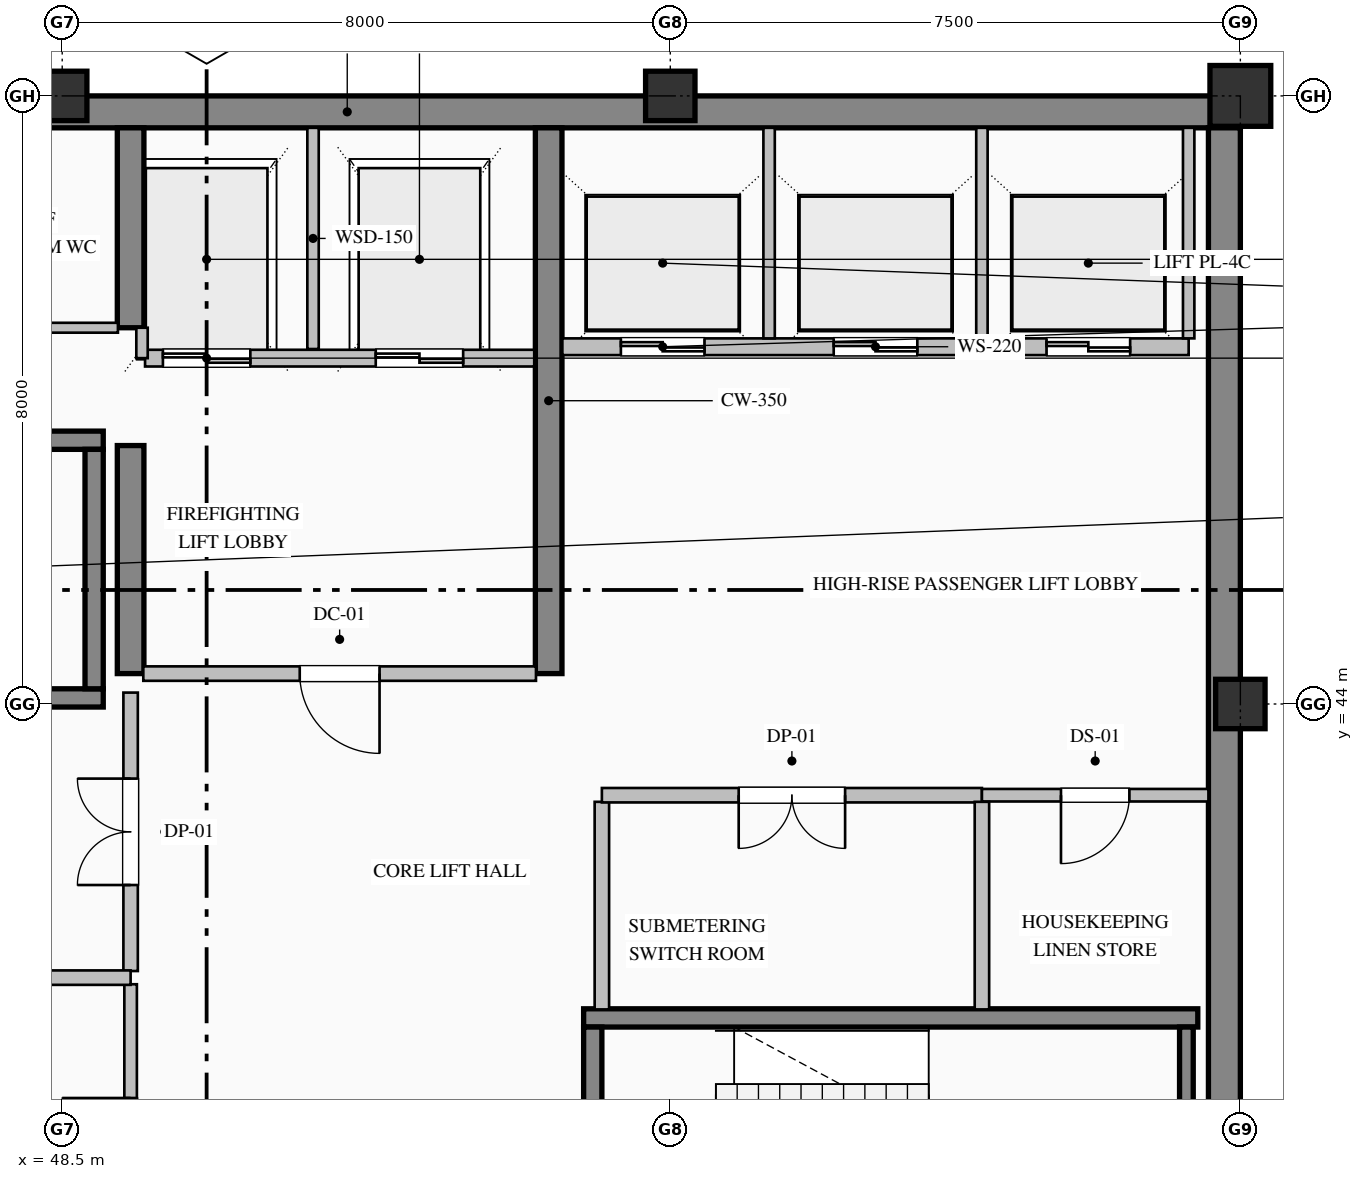
"""IFC4 building model, lengths in metres.
Left out: names, types, materials, properties, quantities, classifications, styles, units other than length and angle.
Written with IfcOpenShell. Run it as: python <this file> out.ifc"""

import sys

from ifc_helpers import new_model, si_unit, direction, frame, frame_2d, origin, origin_2d, place, context, subcontext, project, spatial, rectangle, hollow_rectangle, extrude, element, fill, save


model = new_model("IFC4")
c1 = context("Model", 3, precision=1e-05, world=origin(), true_north=direction((0.0, 1.0)))
c2 = subcontext(c1, "Body", "Model", "MODEL_VIEW")
j1 = project(units=[si_unit("LENGTHUNIT", "METRE"), si_unit("PLANEANGLEUNIT", "RADIAN")], contexts=[c1])
p1 = place(None, origin())
s1 = spatial("IfcSite", under=j1, at=p1, CompositionType="ELEMENT")
p2 = place(p1, origin())
s2 = spatial("IfcBuilding", under=s1, at=p2, CompositionType="ELEMENT")
p3 = place(p2, frame((0.0, 0.0, 311.2)))
s3 = spatial("IfcBuildingStorey", under=s2, at=p3, CompositionType="ELEMENT", Elevation=311.2)
p4 = place(p3, frame((40.5, 51.79, 0.0), z_axis=(0.0, 0.0, 1.0), x_axis=(1.0, 0.0, 0.0)))
e1 = element("IfcWall", 1, at=p4, inside=s3, PredefinedType="SHEAR", context=c2, shape_type="SweptSolid", body=[
    extrude(rectangle(XDim=23.5, YDim=0.42, at=frame_2d((11.75, 0.0))), origin(), (0.0, 0.0, 1.0), 3.785),
])
p5 = place(p3, frame((63.79, 36.32, 0.0), z_axis=(0.0, 0.0, 1.0), x_axis=(0.0, 1.0, 0.0)))
e2 = element("IfcWall", 2, at=p5, inside=s3, PredefinedType="SHEAR", context=c2, shape_type="SweptSolid", body=[
    extrude(rectangle(XDim=15.26, YDim=0.42, at=frame_2d((7.63, 0.0))), origin(), (0.0, 0.0, 1.0), 3.785),
])
p6 = place(p3, frame((49.4, 44.4, 0.0), z_axis=(0.0, 0.0, 1.0), x_axis=(0.0, 1.0, 0.0)))
e3 = element("IfcWall", 3, at=p6, inside=s3, PredefinedType="SHEAR", context=c2, shape_type="SweptSolid", body=[
    extrude(rectangle(XDim=3.0, YDim=0.35, at=frame_2d((1.5, 0.0))), origin(), (0.0, 0.0, 1.0), 3.785),
])
p7 = place(p3, frame((49.4, 48.95, 0.0), z_axis=(0.0, 0.0, 1.0), x_axis=(0.0, 1.0, 0.0)))
e4 = element("IfcWall", 4, at=p7, inside=s3, PredefinedType="SHEAR", context=c2, shape_type="SweptSolid", body=[
    extrude(rectangle(XDim=2.63, YDim=0.35, at=frame_2d((1.315, 0.0))), origin(), (0.0, 0.0, 1.0), 3.785),
])
p8 = place(p3, frame((54.9, 44.4, 0.0), z_axis=(0.0, 0.0, 1.0), x_axis=(0.0, 1.0, 0.0)))
e5 = element("IfcWall", 5, at=p8, inside=s3, PredefinedType="SHEAR", context=c2, shape_type="SweptSolid", body=[
    extrude(rectangle(XDim=7.18, YDim=0.35, at=frame_2d((3.59, 0.0))), origin(), (0.0, 0.0, 1.0), 3.785),
])
for number, where, z_axis, x_axis in (
    (6, (48.5, 52.0, 0.0), (0.0, 0.0, 1.0), (1.0, 0.0, 0.0)),
    (7, (56.5, 52.0, 0.0), (0.0, 0.0, 1.0), (1.0, 0.0, 0.0)),
    (8, (64.0, 44.0, 0.0), (0.0, 0.0, 1.0), (1.0, 0.0, 0.0)),
):
    element("IfcColumn", number, at=place(p3, frame(where, z_axis=z_axis, x_axis=x_axis)), inside=s3, PredefinedType="COLUMN", context=c2, shape_type="SweptSolid", body=[
        extrude(hollow_rectangle(XDim=0.65, YDim=0.65, WallThickness=0.028, at=origin_2d()), origin(), (0.0, 0.0, 1.0), 4.0),
    ])
p9 = place(p3, frame((64.0, 52.0, 0.0), z_axis=(0.0, 0.0, 1.0), x_axis=(1.0, 0.0, 0.0)))
e9 = element("IfcColumn", 9, at=p9, inside=s3, PredefinedType="COLUMN", context=c2, shape_type="SweptSolid", body=[
    extrude(hollow_rectangle(XDim=0.8, YDim=0.8, WallThickness=0.032, at=origin_2d()), origin(), (0.0, 0.0, 1.0), 4.0),
])
for number, where, z_axis, x_axis in (
    (10, (40.96, 47.47, 0.0), (0.0, 0.0, 1.0), (1.0, 0.0, 0.0)),
    (11, (49.04, 44.08, 0.0), (0.0, 0.0, 1.0), (-1.0, 0.0, 0.0)),
):
    element("IfcWall", number, at=place(p3, frame(where, z_axis=z_axis, x_axis=x_axis)), inside=s3, PredefinedType="SOLIDWALL", context=c2, shape_type="SweptSolid", body=[
        extrude(rectangle(XDim=8.08, YDim=0.24, at=frame_2d((4.04, 0.0))), origin(), (0.0, 0.0, 1.0), 4.0),
    ])
p10 = place(p3, frame((48.92, 44.2, 0.0), z_axis=(0.0, 0.0, 1.0), x_axis=(0.0, 1.0, 0.0)))
e12 = element("IfcWall", 12, at=p10, inside=s3, PredefinedType="SOLIDWALL", context=c2, shape_type="SweptSolid", body=[
    extrude(rectangle(XDim=3.15, YDim=0.24, at=frame_2d((1.575, 0.0))), origin(), (0.0, 0.0, 1.0), 4.0),
])
p11 = place(p3, frame((55.36, 39.87, 0.0), z_axis=(0.0, 0.0, 1.0), x_axis=(1.0, 0.0, 0.0)))
e13 = element("IfcWall", 13, at=p11, inside=s3, PredefinedType="SOLIDWALL", context=c2, shape_type="SweptSolid", body=[
    extrude(rectangle(XDim=8.08, YDim=0.24, at=frame_2d((4.04, 0.0))), origin(), (0.0, 0.0, 1.0), 4.0),
])
p12 = place(p3, frame((55.48, 39.75, 0.0), z_axis=(0.0, 0.0, 1.0), x_axis=(0.0, -1.0, 0.0)))
e14 = element("IfcWall", 14, at=p12, inside=s3, PredefinedType="SOLIDWALL", context=c2, shape_type="SweptSolid", body=[
    extrude(rectangle(XDim=3.15, YDim=0.24, at=frame_2d((1.575, 0.0))), origin(), (0.0, 0.0, 1.0), 4.0),
])
p13 = place(p12, frame((1.0, 0.0, 0.0)))
e15 = element("IfcOpeningElement", 15, at=p13, cuts=e14, PredefinedType="OPENING", context=c2, shape_type="SweptSolid", body=[
    extrude(rectangle(XDim=1.15, YDim=2.2, at=frame_2d((0.575, 1.1))), frame((0.0, 0.13, 0.0), z_axis=(0.0, -1.0, 0.0), x_axis=(1.0, 0.0, 0.0)), (0.0, 0.0, 1.0), 0.26),
])
p14 = place(p3, frame((63.29, 36.6, 0.0), z_axis=(0.0, 0.0, 1.0), x_axis=(0.0, 1.0, 0.0)))
e16 = element("IfcWall", 16, at=p14, inside=s3, PredefinedType="SOLIDWALL", context=c2, shape_type="SweptSolid", body=[
    extrude(rectangle(XDim=3.15, YDim=0.18, at=frame_2d((1.575, 0.0))), origin(), (0.0, 0.0, 1.0), 4.0),
])
p15 = place(p3, frame((54.71, 48.55, 0.0), z_axis=(0.0, 0.0, 1.0), x_axis=(-1.0, 0.0, 0.0)))
e17 = element("IfcWall", 17, at=p15, inside=s3, PredefinedType="PARTITIONING", context=c2, shape_type="SweptSolid", body=[
    extrude(rectangle(XDim=5.12, YDim=0.22, at=frame_2d((2.56, 0.0))), origin(), (0.0, 0.0, 1.0), 3.785),
])
p16 = place(p15, frame((3.735, 0.0, 0.0)))
e18 = element("IfcOpeningElement", 18, at=p16, cuts=e17, PredefinedType="OPENING", context=c2, shape_type="SweptSolid", body=[
    extrude(rectangle(XDim=1.15, YDim=2.2, at=frame_2d((0.575, 1.1))), frame((0.0, 0.12, 0.0), z_axis=(0.0, -1.0, 0.0), x_axis=(1.0, 0.0, 0.0)), (0.0, 0.0, 1.0), 0.24),
])
p17 = place(p15, frame((0.935, 0.0, 0.0)))
e19 = element("IfcOpeningElement", 19, at=p17, cuts=e17, PredefinedType="OPENING", context=c2, shape_type="SweptSolid", body=[
    extrude(rectangle(XDim=1.15, YDim=2.2, at=frame_2d((0.575, 1.1))), frame((0.0, 0.12, 0.0), z_axis=(0.0, -1.0, 0.0), x_axis=(1.0, 0.0, 0.0)), (0.0, 0.0, 1.0), 0.24),
])
p18 = place(p3, frame((51.8, 48.67, 0.0), z_axis=(0.0, 0.0, 1.0), x_axis=(0.0, 1.0, 0.0)))
e20 = element("IfcWall", 20, at=p18, inside=s3, PredefinedType="PARTITIONING", context=c2, shape_type="SweptSolid", body=[
    extrude(rectangle(XDim=2.91, YDim=0.15, at=frame_2d((1.455, 0.0))), origin(), (0.0, 0.0, 1.0), 3.785),
])
p19 = place(p3, frame((49.55, 48.55, 0.0), z_axis=(0.0, 0.0, 1.0), x_axis=(0.0, 1.0, 0.0)))
e21 = element("IfcWall", 21, at=p19, inside=s3, PredefinedType="PARTITIONING", context=c2, shape_type="SweptSolid", body=[
    extrude(rectangle(XDim=0.4, YDim=0.15, at=frame_2d((0.2, 0.0))), origin(), (0.0, 0.0, 1.0), 3.785),
])
p20 = place(p3, frame((63.32, 48.7, 0.0), z_axis=(0.0, 0.0, 1.0), x_axis=(-1.0, 0.0, 0.0)))
e22 = element("IfcWall", 22, at=p20, inside=s3, PredefinedType="PARTITIONING", context=c2, shape_type="SweptSolid", body=[
    extrude(rectangle(XDim=8.24, YDim=0.22, at=frame_2d((4.12, 0.0))), origin(), (0.0, 0.0, 1.0), 3.785),
])
p21 = place(p20, frame((6.37, 0.0, 0.0)))
e23 = element("IfcOpeningElement", 23, at=p21, cuts=e22, PredefinedType="OPENING", context=c2, shape_type="SweptSolid", body=[
    extrude(rectangle(XDim=1.1, YDim=2.2, at=frame_2d((0.55, 1.1))), frame((0.0, 0.12, 0.0), z_axis=(0.0, -1.0, 0.0), x_axis=(1.0, 0.0, 0.0)), (0.0, 0.0, 1.0), 0.24),
])
p22 = place(p20, frame((3.57, 0.0, 0.0)))
e24 = element("IfcOpeningElement", 24, at=p22, cuts=e22, PredefinedType="OPENING", context=c2, shape_type="SweptSolid", body=[
    extrude(rectangle(XDim=1.1, YDim=2.2, at=frame_2d((0.55, 1.1))), frame((0.0, 0.12, 0.0), z_axis=(0.0, -1.0, 0.0), x_axis=(1.0, 0.0, 0.0)), (0.0, 0.0, 1.0), 0.24),
])
p23 = place(p20, frame((0.77, 0.0, 0.0)))
e25 = element("IfcOpeningElement", 25, at=p23, cuts=e22, PredefinedType="OPENING", context=c2, shape_type="SweptSolid", body=[
    extrude(rectangle(XDim=1.1, YDim=2.2, at=frame_2d((0.55, 1.1))), frame((0.0, 0.12, 0.0), z_axis=(0.0, -1.0, 0.0), x_axis=(1.0, 0.0, 0.0)), (0.0, 0.0, 1.0), 0.24),
])
for number, where, z_axis, x_axis in (
    (26, (57.8, 48.81, 0.0), (0.0, 0.0, 1.0), (0.0, 1.0, 0.0)),
    (27, (60.6, 48.81, 0.0), (0.0, 0.0, 1.0), (0.0, 1.0, 0.0)),
    (28, (63.32, 48.81, 0.0), (0.0, 0.0, 1.0), (0.0, 1.0, 0.0)),
):
    element("IfcWall", number, at=place(p3, frame(where, z_axis=z_axis, x_axis=x_axis)), inside=s3, PredefinedType="PARTITIONING", context=c2, shape_type="SweptSolid", body=[
        extrude(rectangle(XDim=2.77, YDim=0.15, at=frame_2d((1.385, 0.0))), origin(), (0.0, 0.0, 1.0), 3.785),
    ])
p24 = place(p3, frame((43.5, 48.95, 0.0), z_axis=(0.0, 0.0, 1.0), x_axis=(1.0, 0.0, 0.0)))
e29 = element("IfcWall", 29, at=p24, inside=s3, PredefinedType="PARTITIONING", context=c2, shape_type="SweptSolid", body=[
    extrude(rectangle(XDim=5.733, YDim=0.13, at=frame_2d((2.866, 0.0))), origin(), (0.0, 0.0, 1.0), 3.785),
])
p25 = place(p24, frame((2.406, 0.0, 0.0)))
e30 = element("IfcOpeningElement", 30, at=p25, cuts=e29, PredefinedType="OPENING", context=c2, shape_type="SweptSolid", body=[
    extrude(rectangle(XDim=0.92, YDim=2.15, at=frame_2d((0.46, 1.075))), frame((0.0, 0.075, 0.0), z_axis=(0.0, -1.0, 0.0), x_axis=(1.0, 0.0, 0.0)), (0.0, 0.0, 1.0), 0.15),
])
p26 = place(p3, frame((54.733, 44.4, 0.0), z_axis=(0.0, 0.0, 1.0), x_axis=(-1.0, 0.0, 0.0)))
e31 = element("IfcWall", 31, at=p26, inside=s3, PredefinedType="PARTITIONING", context=c2, shape_type="SweptSolid", body=[
    extrude(rectangle(XDim=5.166, YDim=0.19, at=frame_2d((2.583, 0.0))), origin(), (0.0, 0.0, 1.0), 3.785),
])
p27 = place(p26, frame((2.058, 0.0, 0.0)))
e32 = element("IfcOpeningElement", 32, at=p27, cuts=e31, PredefinedType="OPENING", context=c2, shape_type="SweptSolid", body=[
    extrude(rectangle(XDim=1.05, YDim=2.15, at=frame_2d((0.525, 1.075))), frame((0.0, 0.105, 0.0), z_axis=(0.0, -1.0, 0.0), x_axis=(1.0, 0.0, 0.0)), (0.0, 0.0, 1.0), 0.21),
])
p28 = place(p3, frame((49.4, 36.42, 0.0), z_axis=(0.0, 0.0, 1.0), x_axis=(0.0, 1.0, 0.0)))
e33 = element("IfcWall", 33, at=p28, inside=s3, PredefinedType="PARTITIONING", context=c2, shape_type="SweptSolid", body=[
    extrude(rectangle(XDim=3.893, YDim=0.165, at=frame_2d((1.947, 0.0))), origin(), (0.0, 0.0, 1.0), 3.027),
])
p29 = place(p28, frame((1.497, 0.0, 0.0)))
e34 = element("IfcOpeningElement", 34, at=p29, cuts=e33, PredefinedType="OPENING", context=c2, shape_type="SweptSolid", body=[
    extrude(rectangle(XDim=0.9, YDim=2.15, at=frame_2d((0.45, 1.075))), frame((0.0, 0.093, 0.0), z_axis=(0.0, -1.0, 0.0), x_axis=(1.0, 0.0, 0.0)), (0.0, 0.0, 1.0), 0.185),
])
p30 = place(p3, frame((49.4, 40.487, 0.0), z_axis=(0.0, 0.0, 1.0), x_axis=(0.0, 1.0, 0.0)))
e35 = element("IfcWall", 35, at=p30, inside=s3, PredefinedType="PARTITIONING", context=c2, shape_type="SweptSolid", body=[
    extrude(rectangle(XDim=3.663, YDim=0.19, at=frame_2d((1.832, 0.0))), origin(), (0.0, 0.0, 1.0), 3.027),
])
p31 = place(p30, frame((1.132, 0.0, 0.0)))
e36 = element("IfcOpeningElement", 36, at=p31, cuts=e35, PredefinedType="OPENING", context=c2, shape_type="SweptSolid", body=[
    extrude(rectangle(XDim=1.4, YDim=2.25, at=frame_2d((0.7, 1.125))), frame((0.0, 0.105, 0.0), z_axis=(0.0, -1.0, 0.0), x_axis=(1.0, 0.0, 0.0)), (0.0, 0.0, 1.0), 0.21),
])
p32 = place(p3, frame((55.6, 42.713, 0.0), z_axis=(0.0, 0.0, 1.0), x_axis=(0.0, -1.0, 0.0)))
e37 = element("IfcWall", 37, at=p32, inside=s3, PredefinedType="PARTITIONING", context=c2, shape_type="SweptSolid", body=[
    extrude(rectangle(XDim=2.731, YDim=0.19, at=frame_2d((1.365, 0.0))), origin(), (0.0, 0.0, 1.0), 3.785),
])
p33 = place(p3, frame((40.92, 40.4, 0.0), z_axis=(0.0, 0.0, 1.0), x_axis=(1.0, 0.0, 0.0)))
e38 = element("IfcWall", 38, at=p33, inside=s3, PredefinedType="PARTITIONING", context=c2, shape_type="SweptSolid", body=[
    extrude(rectangle(XDim=8.48, YDim=0.19, at=frame_2d((4.24, 0.0))), origin(), (0.0, 0.0, 1.0), 3.785),
])
p34 = place(p3, frame((60.6, 42.8, 0.0), z_axis=(0.0, 0.0, 1.0), x_axis=(-1.0, 0.0, 0.0)))
e39 = element("IfcWall", 39, at=p34, inside=s3, PredefinedType="PARTITIONING", context=c2, shape_type="SweptSolid", body=[
    extrude(rectangle(XDim=5.0, YDim=0.19, at=frame_2d((2.5, 0.0))), origin(), (0.0, 0.0, 1.0), 3.785),
])
p35 = place(p34, frame((1.8, 0.0, 0.0)))
e40 = element("IfcOpeningElement", 40, at=p35, cuts=e39, PredefinedType="OPENING", context=c2, shape_type="SweptSolid", body=[
    extrude(rectangle(XDim=1.4, YDim=2.25, at=frame_2d((0.7, 1.125))), frame((0.0, 0.105, 0.0), z_axis=(0.0, -1.0, 0.0), x_axis=(1.0, 0.0, 0.0)), (0.0, 0.0, 1.0), 0.21),
])
p36 = place(p3, frame((63.58, 42.8, 0.0), z_axis=(0.0, 0.0, 1.0), x_axis=(-1.0, 0.0, 0.0)))
e41 = element("IfcWall", 41, at=p36, inside=s3, PredefinedType="PARTITIONING", context=c2, shape_type="SweptSolid", body=[
    extrude(rectangle(XDim=2.98, YDim=0.165, at=frame_2d((1.49, 0.0))), origin(), (0.0, 0.0, 1.0), 3.785),
])
p37 = place(p36, frame((1.04, 0.0, 0.0)))
e42 = element("IfcOpeningElement", 42, at=p37, cuts=e41, PredefinedType="OPENING", context=c2, shape_type="SweptSolid", body=[
    extrude(rectangle(XDim=0.9, YDim=2.15, at=frame_2d((0.45, 1.075))), frame((0.0, 0.093, 0.0), z_axis=(0.0, -1.0, 0.0), x_axis=(1.0, 0.0, 0.0)), (0.0, 0.0, 1.0), 0.185),
])
p38 = place(p3, frame((60.6, 42.713, 0.0), z_axis=(0.0, 0.0, 1.0), x_axis=(0.0, -1.0, 0.0)))
e43 = element("IfcWall", 43, at=p38, inside=s3, PredefinedType="PARTITIONING", context=c2, shape_type="SweptSolid", body=[
    extrude(rectangle(XDim=2.731, YDim=0.19, at=frame_2d((1.365, 0.0))), origin(), (0.0, 0.0, 1.0), 3.785),
])
p39 = place(p16, origin())
e44 = element("IfcDoor", 44, at=p39, inside=s3, OperationType="DOUBLE_DOOR_SLIDING", PredefinedType="DOOR", context=c2, shape_type="SweptSolid", body=[
    extrude(rectangle(XDim=1.15, YDim=2.2, at=frame_2d((0.575, 1.1))), frame((0.0, 0.025, 0.0), z_axis=(0.0, -1.0, 0.0), x_axis=(1.0, 0.0, 0.0)), (0.0, 0.0, 1.0), 0.05),
])
fill(e18, e44)
p40 = place(p17, origin())
e45 = element("IfcDoor", 45, at=p40, inside=s3, OperationType="DOUBLE_DOOR_SLIDING", PredefinedType="DOOR", context=c2, shape_type="SweptSolid", body=[
    extrude(rectangle(XDim=1.15, YDim=2.2, at=frame_2d((0.575, 1.1))), frame((0.0, 0.025, 0.0), z_axis=(0.0, -1.0, 0.0), x_axis=(1.0, 0.0, 0.0)), (0.0, 0.0, 1.0), 0.05),
])
fill(e19, e45)
p41 = place(p21, origin())
e46 = element("IfcDoor", 46, at=p41, inside=s3, OperationType="DOUBLE_DOOR_SLIDING", PredefinedType="DOOR", context=c2, shape_type="SweptSolid", body=[
    extrude(rectangle(XDim=1.1, YDim=2.2, at=frame_2d((0.55, 1.1))), frame((0.0, 0.025, 0.0), z_axis=(0.0, -1.0, 0.0), x_axis=(1.0, 0.0, 0.0)), (0.0, 0.0, 1.0), 0.05),
])
fill(e23, e46)
p42 = place(p22, origin())
e47 = element("IfcDoor", 47, at=p42, inside=s3, OperationType="DOUBLE_DOOR_SLIDING", PredefinedType="DOOR", context=c2, shape_type="SweptSolid", body=[
    extrude(rectangle(XDim=1.1, YDim=2.2, at=frame_2d((0.55, 1.1))), frame((0.0, 0.025, 0.0), z_axis=(0.0, -1.0, 0.0), x_axis=(1.0, 0.0, 0.0)), (0.0, 0.0, 1.0), 0.05),
])
fill(e24, e47)
p43 = place(p23, origin())
e48 = element("IfcDoor", 48, at=p43, inside=s3, OperationType="DOUBLE_DOOR_SLIDING", PredefinedType="DOOR", context=c2, shape_type="SweptSolid", body=[
    extrude(rectangle(XDim=1.1, YDim=2.2, at=frame_2d((0.55, 1.1))), frame((0.0, 0.025, 0.0), z_axis=(0.0, -1.0, 0.0), x_axis=(1.0, 0.0, 0.0)), (0.0, 0.0, 1.0), 0.05),
])
fill(e25, e48)
p44 = place(p27, origin())
e49 = element("IfcDoor", 49, at=p44, inside=s3, OperationType="SINGLE_SWING_LEFT", PredefinedType="DOOR", context=c2, shape_type="SweptSolid", body=[
    extrude(rectangle(XDim=1.05, YDim=2.15, at=frame_2d((0.525, 1.075))), frame((0.0, 0.025, 0.0), z_axis=(0.0, -1.0, 0.0), x_axis=(1.0, 0.0, 0.0)), (0.0, 0.0, 1.0), 0.05),
])
fill(e32, e49)
p45 = place(p29, origin())
e50 = element("IfcDoor", 50, at=p45, inside=s3, OperationType="SINGLE_SWING_RIGHT", PredefinedType="DOOR", context=c2, shape_type="SweptSolid", body=[
    extrude(rectangle(XDim=0.9, YDim=2.15, at=frame_2d((0.45, 1.075))), frame((0.0, 0.025, 0.0), z_axis=(0.0, -1.0, 0.0), x_axis=(1.0, 0.0, 0.0)), (0.0, 0.0, 1.0), 0.05),
])
fill(e34, e50)
p46 = place(p31, origin())
e51 = element("IfcDoor", 51, at=p46, inside=s3, OperationType="DOUBLE_DOOR_SINGLE_SWING", PredefinedType="DOOR", context=c2, shape_type="SweptSolid", body=[
    extrude(rectangle(XDim=1.4, YDim=2.25, at=frame_2d((0.7, 1.125))), frame((0.0, 0.025, 0.0), z_axis=(0.0, -1.0, 0.0), x_axis=(1.0, 0.0, 0.0)), (0.0, 0.0, 1.0), 0.05),
])
fill(e36, e51)
p47 = place(p35, origin())
e52 = element("IfcDoor", 52, at=p47, inside=s3, OperationType="DOUBLE_DOOR_SINGLE_SWING", PredefinedType="DOOR", context=c2, shape_type="SweptSolid", body=[
    extrude(rectangle(XDim=1.4, YDim=2.25, at=frame_2d((0.7, 1.125))), frame((0.0, 0.025, 0.0), z_axis=(0.0, -1.0, 0.0), x_axis=(1.0, 0.0, 0.0)), (0.0, 0.0, 1.0), 0.05),
])
fill(e40, e52)
p48 = place(p37, origin())
e53 = element("IfcDoor", 53, at=p48, inside=s3, OperationType="SINGLE_SWING_RIGHT", PredefinedType="DOOR", context=c2, shape_type="SweptSolid", body=[
    extrude(rectangle(XDim=0.9, YDim=2.15, at=frame_2d((0.45, 1.075))), frame((0.0, 0.025, 0.0), z_axis=(0.0, -1.0, 0.0), x_axis=(1.0, 0.0, 0.0)), (0.0, 0.0, 1.0), 0.05),
])
fill(e42, e53)
save(model, sys.argv[1])
